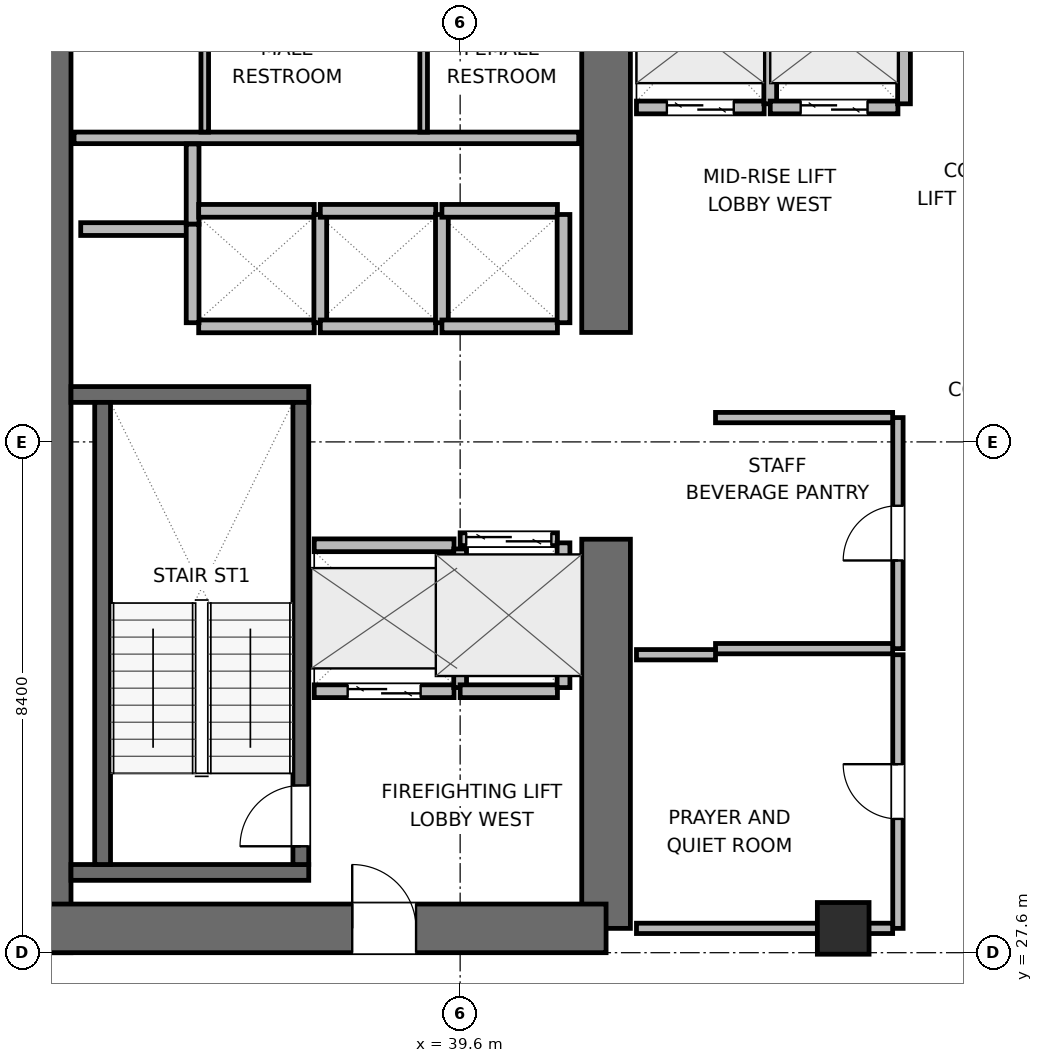
"""IFC4 building model, lengths in metres.
Left out: names, types, materials, properties, quantities, classifications, styles, units other than length and angle.
Written with IfcOpenShell. Run it as: python <this file> out.ifc"""

import sys

from ifc_helpers import new_model, si_unit, direction, frame, frame_2d, origin, origin_2d, place, context, subcontext, project, spatial, rectangle, extrude, element, fill, save


model = new_model("IFC4")
c1 = context("Model", 3, precision=1e-05, world=origin(), true_north=direction((0.0, 1.0)))
c2 = subcontext(c1, "Body", "Model", "MODEL_VIEW")
j1 = project(units=[si_unit("LENGTHUNIT", "METRE"), si_unit("PLANEANGLEUNIT", "RADIAN")], contexts=[c1])
p1 = place(None, origin())
s1 = spatial("IfcSite", under=j1, at=p1, CompositionType="ELEMENT")
p2 = place(p1, origin())
s2 = spatial("IfcBuilding", under=s1, at=p2, CompositionType="ELEMENT")
p3 = place(p2, frame((0.0, 0.0, 150.6)))
s3 = spatial("IfcBuildingStorey", under=s2, at=p3, CompositionType="ELEMENT", Elevation=150.6)
p4 = place(p3, frame((32.8, 27.6, 0.0), z_axis=(0.0, 0.0, 1.0), x_axis=(0.0, 1.0, 0.0)))
e1 = element("IfcWall", 1, at=p4, inside=s3, PredefinedType="SHEAR", context=c2, shape_type="SweptSolid", body=[
    extrude(rectangle(XDim=16.8, YDim=0.8, at=frame_2d((8.4, 0.0))), origin(), (0.0, 0.0, 1.0), 3.9),
])
p5 = place(p3, frame((42.0, 28.0, 0.0), z_axis=(0.0, 0.0, 1.0), x_axis=(0.0, 1.0, 0.0)))
e2 = element("IfcWall", 2, at=p5, inside=s3, PredefinedType="SHEAR", context=c2, shape_type="SweptSolid", body=[
    extrude(rectangle(XDim=6.4, YDim=0.8, at=frame_2d((3.2, 0.0))), origin(), (0.0, 0.0, 1.0), 3.9),
])
p6 = place(p3, frame((42.0, 37.8, 0.0), z_axis=(0.0, 0.0, 1.0), x_axis=(0.0, 1.0, 0.0)))
e3 = element("IfcWall", 3, at=p6, inside=s3, PredefinedType="SHEAR", context=c2, shape_type="SweptSolid", body=[
    extrude(rectangle(XDim=6.2, YDim=0.8, at=frame_2d((3.1, 0.0))), origin(), (0.0, 0.0, 1.0), 3.9),
])
p7 = place(p3, frame((32.8, 28.0, 0.0), z_axis=(0.0, 0.0, 1.0), x_axis=(1.0, 0.0, 0.0)))
e4 = element("IfcWall", 4, at=p7, inside=s3, PredefinedType="SHEAR", context=c2, shape_type="SweptSolid", body=[
    extrude(rectangle(XDim=9.2, YDim=0.8, at=frame_2d((4.6, 0.0))), origin(), (0.0, 0.0, 1.0), 3.9),
])
p8 = place(p7, frame((5.025, 0.0, 0.0)))
e5 = element("IfcOpeningElement", 5, at=p8, cuts=e4, PredefinedType="OPENING", context=c2, shape_type="SweptSolid", body=[
    extrude(rectangle(XDim=1.05, YDim=2.04, at=frame_2d((0.525, 1.02))), frame((0.0, 0.41, 0.0), z_axis=(0.0, -1.0, 0.0), x_axis=(1.0, 0.0, 0.0)), (0.0, 0.0, 1.0), 0.82),
])
for number, where, z_axis, x_axis in (
    (6, (33.2, 28.92, 0.0), (0.0, 0.0, 1.0), (1.0, 0.0, 0.0)),
    (7, (33.2, 36.78, 0.0), (0.0, 0.0, 1.0), (1.0, 0.0, 0.0)),
):
    element("IfcWall", number, at=place(p3, frame(where, z_axis=z_axis, x_axis=x_axis)), inside=s3, PredefinedType="SHEAR", context=c2, shape_type="SweptSolid", body=[
        extrude(rectangle(XDim=3.91, YDim=0.26, at=frame_2d((1.955, 0.0))), origin(), (0.0, 0.0, 1.0), 3.9),
    ])
p9 = place(p3, frame((33.72, 29.05, 0.0), z_axis=(0.0, 0.0, 1.0), x_axis=(0.0, 1.0, 0.0)))
e8 = element("IfcWall", 8, at=p9, inside=s3, PredefinedType="SHEAR", context=c2, shape_type="SweptSolid", body=[
    extrude(rectangle(XDim=7.6, YDim=0.26, at=frame_2d((3.8, 0.0))), origin(), (0.0, 0.0, 1.0), 3.9),
])
p10 = place(p3, frame((36.98, 29.05, 0.0), z_axis=(0.0, 0.0, 1.0), x_axis=(0.0, 1.0, 0.0)))
e9 = element("IfcWall", 9, at=p10, inside=s3, PredefinedType="SHEAR", context=c2, shape_type="SweptSolid", body=[
    extrude(rectangle(XDim=7.6, YDim=0.26, at=frame_2d((3.8, 0.0))), origin(), (0.0, 0.0, 1.0), 3.9),
])
p11 = place(p10, frame((0.3, 0.0, 0.0)))
e10 = element("IfcOpeningElement", 10, at=p11, cuts=e9, PredefinedType="OPENING", context=c2, shape_type="SweptSolid", body=[
    extrude(rectangle(XDim=1.0, YDim=2.04, at=frame_2d((0.5, 1.02))), frame((0.0, 0.14, 0.0), z_axis=(0.0, -1.0, 0.0), x_axis=(1.0, 0.0, 0.0)), (0.0, 0.0, 1.0), 0.28),
])
p12 = place(p3, frame((45.9, 28.0, 0.0), z_axis=(0.0, 0.0, 1.0), x_axis=(1.0, 0.0, 0.0)))
e11 = element("IfcColumn", 11, at=p12, inside=s3, PredefinedType="COLUMN", context=c2, shape_type="SweptSolid", body=[
    extrude(rectangle(XDim=0.85, YDim=0.85, at=origin_2d()), origin(), (0.0, 0.0, 1.0), 3.9),
])
p13 = place(p3, frame((33.25, 41.0, 0.0), z_axis=(0.0, 0.0, 1.0), x_axis=(1.0, 0.0, 0.0)))
e12 = element("IfcWall", 12, at=p13, inside=s3, PredefinedType="PLUMBINGWALL", context=c2, shape_type="SweptSolid", body=[
    extrude(rectangle(XDim=8.3, YDim=0.19, at=frame_2d((4.15, 0.0))), origin(), (0.0, 0.0, 1.0), 3.68),
])
for number, where, z_axis, x_axis in (
    (13, (35.4, 41.095, 0.0), (0.0, 0.0, 1.0), (0.0, 1.0, 0.0)),
    (14, (39.0, 41.095, 0.0), (0.0, 0.0, 1.0), (0.0, 1.0, 0.0)),
):
    element("IfcWall", number, at=place(p3, frame(where, z_axis=z_axis, x_axis=x_axis)), inside=s3, PredefinedType="PARTITIONING", context=c2, shape_type="SweptSolid", body=[
        extrude(rectangle(XDim=2.455, YDim=0.125, at=frame_2d((1.228, 0.0))), origin(), (0.0, 0.0, 1.0), 3.68),
    ])
p14 = place(p3, frame((33.36, 39.5, 0.0), z_axis=(0.0, 0.0, 1.0), x_axis=(1.0, 0.0, 0.0)))
e15 = element("IfcWall", 15, at=p14, inside=s3, PredefinedType="PARTITIONING", context=c2, shape_type="SweptSolid", body=[
    extrude(rectangle(XDim=1.86, YDim=0.21, at=frame_2d((0.93, 0.0))), origin(), (0.0, 0.0, 1.0), 3.68),
])
p15 = place(p3, frame((35.2, 39.58, 0.0), z_axis=(0.0, 0.0, 1.0), x_axis=(0.0, 1.0, 0.0)))
e16 = element("IfcWall", 16, at=p15, inside=s3, PredefinedType="PARTITIONING", context=c2, shape_type="SweptSolid", body=[
    extrude(rectangle(XDim=1.32, YDim=0.21, at=frame_2d((0.66, 0.0))), origin(), (0.0, 0.0, 1.0), 3.68),
])
p16 = place(p3, frame((37.2, 31.9, 0.0), z_axis=(0.0, 0.0, 1.0), x_axis=(1.0, 0.0, 0.0)))
e17 = element("IfcWall", 17, at=p16, inside=s3, PredefinedType="PARTITIONING", context=c2, shape_type="SweptSolid", body=[
    extrude(rectangle(XDim=2.3, YDim=0.21, at=frame_2d((1.15, 0.0))), origin(), (0.0, 0.0, 1.0), 3.68),
])
p17 = place(p16, frame((0.55, 0.0, 0.0)))
e18 = element("IfcOpeningElement", 18, at=p17, cuts=e17, PredefinedType="OPENING", context=c2, shape_type="SweptSolid", body=[
    extrude(rectangle(XDim=1.2, YDim=2.04, at=frame_2d((0.6, 1.02))), frame((0.0, 0.115, 0.0), z_axis=(0.0, -1.0, 0.0), x_axis=(1.0, 0.0, 0.0)), (0.0, 0.0, 1.0), 0.23),
])
p18 = place(p3, frame((37.2, 34.3, 0.0), z_axis=(0.0, 0.0, 1.0), x_axis=(1.0, 0.0, 0.0)))
e19 = element("IfcWall", 19, at=p18, inside=s3, PredefinedType="PARTITIONING", context=c2, shape_type="SweptSolid", body=[
    extrude(rectangle(XDim=2.3, YDim=0.21, at=frame_2d((1.15, 0.0))), origin(), (0.0, 0.0, 1.0), 3.68),
])
p19 = place(p3, frame((39.6, 31.96, 0.0), z_axis=(0.0, 0.0, 1.0), x_axis=(0.0, 1.0, 0.0)))
e20 = element("IfcWall", 20, at=p19, inside=s3, PredefinedType="PARTITIONING", context=c2, shape_type="SweptSolid", body=[
    extrude(rectangle(XDim=2.28, YDim=0.21, at=frame_2d((1.14, 0.0))), origin(), (0.0, 0.0, 1.0), 3.68),
])
p20 = place(p3, frame((39.6, 34.4, 0.0), z_axis=(0.0, 0.0, 1.0), x_axis=(1.0, 0.0, 0.0)))
e21 = element("IfcWall", 21, at=p20, inside=s3, PredefinedType="PARTITIONING", context=c2, shape_type="SweptSolid", body=[
    extrude(rectangle(XDim=1.6, YDim=0.21, at=frame_2d((0.8, 0.0))), origin(), (0.0, 0.0, 1.0), 3.68),
])
p21 = place(p20, frame((0.1, 0.0, 0.0)))
e22 = element("IfcOpeningElement", 22, at=p21, cuts=e21, PredefinedType="OPENING", context=c2, shape_type="SweptSolid", body=[
    extrude(rectangle(XDim=1.4, YDim=2.06, at=frame_2d((0.7, 1.03))), frame((0.0, 0.115, 0.0), z_axis=(0.0, -1.0, 0.0), x_axis=(1.0, 0.0, 0.0)), (0.0, 0.0, 1.0), 0.23),
])
p22 = place(p3, frame((39.6, 31.9, 0.0), z_axis=(0.0, 0.0, 1.0), x_axis=(1.0, 0.0, 0.0)))
e23 = element("IfcWall", 23, at=p22, inside=s3, PredefinedType="PARTITIONING", context=c2, shape_type="SweptSolid", body=[
    extrude(rectangle(XDim=1.6, YDim=0.21, at=frame_2d((0.8, 0.0))), origin(), (0.0, 0.0, 1.0), 3.68),
])
p23 = place(p3, frame((41.3, 31.96, 0.0), z_axis=(0.0, 0.0, 1.0), x_axis=(0.0, 1.0, 0.0)))
e24 = element("IfcWall", 24, at=p23, inside=s3, PredefinedType="PARTITIONING", context=c2, shape_type="SweptSolid", body=[
    extrude(rectangle(XDim=2.38, YDim=0.21, at=frame_2d((1.19, 0.0))), origin(), (0.0, 0.0, 1.0), 3.68),
])
p24 = place(p3, frame((42.5, 41.5, 0.0), z_axis=(0.0, 0.0, 1.0), x_axis=(1.0, 0.0, 0.0)))
e25 = element("IfcWall", 25, at=p24, inside=s3, PredefinedType="PARTITIONING", context=c2, shape_type="SweptSolid", body=[
    extrude(rectangle(XDim=2.1, YDim=0.21, at=frame_2d((1.05, 0.0))), origin(), (0.0, 0.0, 1.0), 3.68),
])
p25 = place(p24, frame((0.5, 0.0, 0.0)))
e26 = element("IfcOpeningElement", 26, at=p25, cuts=e25, PredefinedType="OPENING", context=c2, shape_type="SweptSolid", body=[
    extrude(rectangle(XDim=1.1, YDim=2.04, at=frame_2d((0.55, 1.02))), frame((0.0, 0.115, 0.0), z_axis=(0.0, -1.0, 0.0), x_axis=(1.0, 0.0, 0.0)), (0.0, 0.0, 1.0), 0.23),
])
p26 = place(p3, frame((44.7, 41.56, 0.0), z_axis=(0.0, 0.0, 1.0), x_axis=(0.0, 1.0, 0.0)))
e27 = element("IfcWall", 27, at=p26, inside=s3, PredefinedType="PARTITIONING", context=c2, shape_type="SweptSolid", body=[
    extrude(rectangle(XDim=2.28, YDim=0.21, at=frame_2d((1.14, 0.0))), origin(), (0.0, 0.0, 1.0), 3.68),
])
p27 = place(p3, frame((44.7, 41.5, 0.0), z_axis=(0.0, 0.0, 1.0), x_axis=(1.0, 0.0, 0.0)))
e28 = element("IfcWall", 28, at=p27, inside=s3, PredefinedType="PARTITIONING", context=c2, shape_type="SweptSolid", body=[
    extrude(rectangle(XDim=2.1, YDim=0.21, at=frame_2d((1.05, 0.0))), origin(), (0.0, 0.0, 1.0), 3.68),
])
p28 = place(p27, frame((0.5, 0.0, 0.0)))
e29 = element("IfcOpeningElement", 29, at=p28, cuts=e28, PredefinedType="OPENING", context=c2, shape_type="SweptSolid", body=[
    extrude(rectangle(XDim=1.1, YDim=2.04, at=frame_2d((0.55, 1.02))), frame((0.0, 0.115, 0.0), z_axis=(0.0, -1.0, 0.0), x_axis=(1.0, 0.0, 0.0)), (0.0, 0.0, 1.0), 0.23),
])
p29 = place(p3, frame((46.9, 41.56, 0.0), z_axis=(0.0, 0.0, 1.0), x_axis=(0.0, 1.0, 0.0)))
e30 = element("IfcWall", 30, at=p29, inside=s3, PredefinedType="PARTITIONING", context=c2, shape_type="SweptSolid", body=[
    extrude(rectangle(XDim=2.28, YDim=0.21, at=frame_2d((1.14, 0.0))), origin(), (0.0, 0.0, 1.0), 3.68),
])
for number, where, z_axis, x_axis in (
    (31, (35.3, 37.9, 0.0), (0.0, 0.0, 1.0), (1.0, 0.0, 0.0)),
    (32, (35.3, 39.8, 0.0), (0.0, 0.0, 1.0), (1.0, 0.0, 0.0)),
):
    element("IfcWall", number, at=place(p3, frame(where, z_axis=z_axis, x_axis=x_axis)), inside=s3, PredefinedType="PARTITIONING", context=c2, shape_type="SweptSolid", body=[
        extrude(rectangle(XDim=1.9, YDim=0.21, at=frame_2d((0.95, 0.0))), origin(), (0.0, 0.0, 1.0), 3.68),
    ])
p30 = place(p3, frame((35.2, 37.96, 0.0), z_axis=(0.0, 0.0, 1.0), x_axis=(0.0, 1.0, 0.0)))
e33 = element("IfcWall", 33, at=p30, inside=s3, PredefinedType="PARTITIONING", context=c2, shape_type="SweptSolid", body=[
    extrude(rectangle(XDim=1.62, YDim=0.21, at=frame_2d((0.81, 0.0))), origin(), (0.0, 0.0, 1.0), 3.68),
])
p31 = place(p3, frame((37.3, 37.96, 0.0), z_axis=(0.0, 0.0, 1.0), x_axis=(0.0, 1.0, 0.0)))
e34 = element("IfcWall", 34, at=p31, inside=s3, PredefinedType="PARTITIONING", context=c2, shape_type="SweptSolid", body=[
    extrude(rectangle(XDim=1.78, YDim=0.21, at=frame_2d((0.89, 0.0))), origin(), (0.0, 0.0, 1.0), 3.68),
])
for number, where, z_axis, x_axis in (
    (35, (37.3, 37.9, 0.0), (0.0, 0.0, 1.0), (1.0, 0.0, 0.0)),
    (36, (37.3, 39.8, 0.0), (0.0, 0.0, 1.0), (1.0, 0.0, 0.0)),
):
    element("IfcWall", number, at=place(p3, frame(where, z_axis=z_axis, x_axis=x_axis)), inside=s3, PredefinedType="PARTITIONING", context=c2, shape_type="SweptSolid", body=[
        extrude(rectangle(XDim=1.9, YDim=0.21, at=frame_2d((0.95, 0.0))), origin(), (0.0, 0.0, 1.0), 3.68),
    ])
p32 = place(p3, frame((39.3, 37.96, 0.0), z_axis=(0.0, 0.0, 1.0), x_axis=(0.0, 1.0, 0.0)))
e37 = element("IfcWall", 37, at=p32, inside=s3, PredefinedType="PARTITIONING", context=c2, shape_type="SweptSolid", body=[
    extrude(rectangle(XDim=1.78, YDim=0.21, at=frame_2d((0.89, 0.0))), origin(), (0.0, 0.0, 1.0), 3.68),
])
for number, where, z_axis, x_axis in (
    (38, (39.3, 37.9, 0.0), (0.0, 0.0, 1.0), (1.0, 0.0, 0.0)),
    (39, (39.3, 39.8, 0.0), (0.0, 0.0, 1.0), (1.0, 0.0, 0.0)),
):
    element("IfcWall", number, at=place(p3, frame(where, z_axis=z_axis, x_axis=x_axis)), inside=s3, PredefinedType="PARTITIONING", context=c2, shape_type="SweptSolid", body=[
        extrude(rectangle(XDim=1.9, YDim=0.21, at=frame_2d((0.95, 0.0))), origin(), (0.0, 0.0, 1.0), 3.68),
    ])
p33 = place(p3, frame((41.3, 37.96, 0.0), z_axis=(0.0, 0.0, 1.0), x_axis=(0.0, 1.0, 0.0)))
e40 = element("IfcWall", 40, at=p33, inside=s3, PredefinedType="PARTITIONING", context=c2, shape_type="SweptSolid", body=[
    extrude(rectangle(XDim=1.78, YDim=0.21, at=frame_2d((0.89, 0.0))), origin(), (0.0, 0.0, 1.0), 3.68),
])
p34 = place(p3, frame((46.8, 32.6, 0.0), z_axis=(0.0, 0.0, 1.0), x_axis=(0.0, 1.0, 0.0)))
e41 = element("IfcWall", 41, at=p34, inside=s3, PredefinedType="PARTITIONING", context=c2, shape_type="SweptSolid", body=[
    extrude(rectangle(XDim=3.8, YDim=0.17, at=frame_2d((1.9, 0.0))), origin(), (0.0, 0.0, 1.0), 3.68),
])
p35 = place(p34, frame((1.45, 0.0, 0.0)))
e42 = element("IfcOpeningElement", 42, at=p35, cuts=e41, PredefinedType="OPENING", context=c2, shape_type="SweptSolid", body=[
    extrude(rectangle(XDim=0.9, YDim=2.02, at=frame_2d((0.45, 1.01))), frame((0.0, 0.095, 0.0), z_axis=(0.0, -1.0, 0.0), x_axis=(1.0, 0.0, 0.0)), (0.0, 0.0, 1.0), 0.19),
])
for number, where, z_axis, x_axis in (
    (43, (43.8, 32.6, 0.0), (0.0, 0.0, 1.0), (1.0, 0.0, 0.0)),
    (44, (43.8, 36.4, 0.0), (0.0, 0.0, 1.0), (1.0, 0.0, 0.0)),
):
    element("IfcWall", number, at=place(p3, frame(where, z_axis=z_axis, x_axis=x_axis)), inside=s3, PredefinedType="PARTITIONING", context=c2, shape_type="SweptSolid", body=[
        extrude(rectangle(XDim=2.913, YDim=0.17, at=frame_2d((1.457, 0.0))), origin(), (0.0, 0.0, 1.0), 3.68),
    ])
p36 = place(p3, frame((46.8, 28.0, 0.0), z_axis=(0.0, 0.0, 1.0), x_axis=(0.0, 1.0, 0.0)))
e45 = element("IfcWall", 45, at=p36, inside=s3, PredefinedType="PARTITIONING", context=c2, shape_type="SweptSolid", body=[
    extrude(rectangle(XDim=4.5, YDim=0.17, at=frame_2d((2.25, 0.0))), origin(), (0.0, 0.0, 1.0), 3.68),
])
p37 = place(p36, frame((1.8, 0.0, 0.0)))
e46 = element("IfcOpeningElement", 46, at=p37, cuts=e45, PredefinedType="OPENING", context=c2, shape_type="SweptSolid", body=[
    extrude(rectangle(XDim=0.9, YDim=2.02, at=frame_2d((0.45, 1.01))), frame((0.0, 0.095, 0.0), z_axis=(0.0, -1.0, 0.0), x_axis=(1.0, 0.0, 0.0)), (0.0, 0.0, 1.0), 0.19),
])
p38 = place(p3, frame((42.5, 28.0, 0.0), z_axis=(0.0, 0.0, 1.0), x_axis=(1.0, 0.0, 0.0)))
e47 = element("IfcWall", 47, at=p38, inside=s3, PredefinedType="PARTITIONING", context=c2, shape_type="SweptSolid", body=[
    extrude(rectangle(XDim=4.213, YDim=0.17, at=frame_2d((2.106, 0.0))), origin(), (0.0, 0.0, 1.0), 2.565),
])
p39 = place(p3, frame((42.5, 32.5, 0.0), z_axis=(0.0, 0.0, 1.0), x_axis=(1.0, 0.0, 0.0)))
e48 = element("IfcWall", 48, at=p39, inside=s3, PredefinedType="PARTITIONING", context=c2, shape_type="SweptSolid", body=[
    extrude(rectangle(XDim=1.3, YDim=0.17, at=frame_2d((0.65, 0.0))), origin(), (0.0, 0.0, 1.0), 3.68),
])
p40 = place(p11, origin())
e49 = element("IfcDoor", 49, at=p40, inside=s3, OperationType="SINGLE_SWING_LEFT", PredefinedType="DOOR", context=c2, shape_type="SweptSolid", body=[
    extrude(rectangle(XDim=1.0, YDim=2.04, at=frame_2d((0.5, 1.02))), frame((0.0, 0.025, 0.0), z_axis=(0.0, -1.0, 0.0), x_axis=(1.0, 0.0, 0.0)), (0.0, 0.0, 1.0), 0.05),
])
fill(e10, e49)
p41 = place(p17, origin())
e50 = element("IfcDoor", 50, at=p41, inside=s3, OperationType="DOUBLE_DOOR_SLIDING", PredefinedType="DOOR", context=c2, shape_type="SweptSolid", body=[
    extrude(rectangle(XDim=1.2, YDim=2.04, at=frame_2d((0.6, 1.02))), frame((0.0, 0.025, 0.0), z_axis=(0.0, -1.0, 0.0), x_axis=(1.0, 0.0, 0.0)), (0.0, 0.0, 1.0), 0.05),
])
fill(e18, e50)
p42 = place(p21, origin())
e51 = element("IfcDoor", 51, at=p42, inside=s3, OperationType="DOUBLE_DOOR_SLIDING", PredefinedType="DOOR", context=c2, shape_type="SweptSolid", body=[
    extrude(rectangle(XDim=1.4, YDim=2.06, at=frame_2d((0.7, 1.03))), frame((0.0, 0.025, 0.0), z_axis=(0.0, -1.0, 0.0), x_axis=(1.0, 0.0, 0.0)), (0.0, 0.0, 1.0), 0.05),
])
fill(e22, e51)
p43 = place(p25, origin())
e52 = element("IfcDoor", 52, at=p43, inside=s3, OperationType="DOUBLE_DOOR_SLIDING", PredefinedType="DOOR", context=c2, shape_type="SweptSolid", body=[
    extrude(rectangle(XDim=1.1, YDim=2.04, at=frame_2d((0.55, 1.02))), frame((0.0, 0.025, 0.0), z_axis=(0.0, -1.0, 0.0), x_axis=(1.0, 0.0, 0.0)), (0.0, 0.0, 1.0), 0.05),
])
fill(e26, e52)
p44 = place(p28, origin())
e53 = element("IfcDoor", 53, at=p44, inside=s3, OperationType="DOUBLE_DOOR_SLIDING", PredefinedType="DOOR", context=c2, shape_type="SweptSolid", body=[
    extrude(rectangle(XDim=1.1, YDim=2.04, at=frame_2d((0.55, 1.02))), frame((0.0, 0.025, 0.0), z_axis=(0.0, -1.0, 0.0), x_axis=(1.0, 0.0, 0.0)), (0.0, 0.0, 1.0), 0.05),
])
fill(e29, e53)
p45 = place(p8, origin())
e54 = element("IfcDoor", 54, at=p45, inside=s3, OperationType="SINGLE_SWING_LEFT", PredefinedType="DOOR", context=c2, shape_type="SweptSolid", body=[
    extrude(rectangle(XDim=1.05, YDim=2.04, at=frame_2d((0.525, 1.02))), frame((0.0, 0.025, 0.0), z_axis=(0.0, -1.0, 0.0), x_axis=(1.0, 0.0, 0.0)), (0.0, 0.0, 1.0), 0.05),
])
fill(e5, e54)
p46 = place(p35, origin())
e55 = element("IfcDoor", 55, at=p46, inside=s3, OperationType="SINGLE_SWING_LEFT", PredefinedType="DOOR", context=c2, shape_type="SweptSolid", body=[
    extrude(rectangle(XDim=0.9, YDim=2.02, at=frame_2d((0.45, 1.01))), frame((0.0, 0.025, 0.0), z_axis=(0.0, -1.0, 0.0), x_axis=(1.0, 0.0, 0.0)), (0.0, 0.0, 1.0), 0.05),
])
fill(e42, e55)
p47 = place(p37, origin())
e56 = element("IfcDoor", 56, at=p47, inside=s3, OperationType="SINGLE_SWING_RIGHT", PredefinedType="DOOR", context=c2, shape_type="SweptSolid", body=[
    extrude(rectangle(XDim=0.9, YDim=2.02, at=frame_2d((0.45, 1.01))), frame((0.0, 0.025, 0.0), z_axis=(0.0, -1.0, 0.0), x_axis=(1.0, 0.0, 0.0)), (0.0, 0.0, 1.0), 0.05),
])
fill(e46, e56)
save(model, sys.argv[1])
